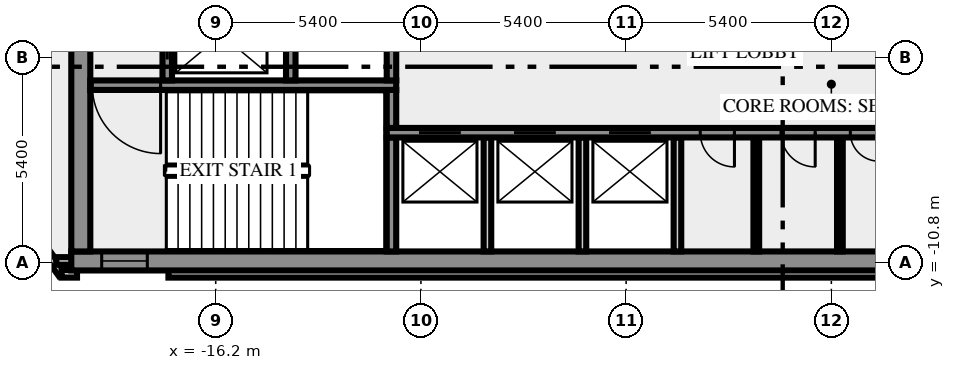
"""IFC4 building model, lengths in metres.
Left out: names, types, materials, properties, quantities, classifications, styles, units other than length and angle.
Written with IfcOpenShell. Run it as: python <this file> out.ifc"""

import sys

from ifc_helpers import new_model, si_unit, direction, frame, frame_2d, origin, place, context, subcontext, project, spatial, rectangle, extrude, element, fill, save


model = new_model("IFC4")
c1 = context("Model", 3, precision=1e-05, world=origin(), true_north=direction((0.0, 1.0)))
c2 = subcontext(c1, "Body", "Model", "MODEL_VIEW")
j1 = project(units=[si_unit("LENGTHUNIT", "METRE"), si_unit("PLANEANGLEUNIT", "RADIAN")], contexts=[c1])
p1 = place(None, origin())
s1 = spatial("IfcSite", under=j1, at=p1, CompositionType="ELEMENT")
p2 = place(p1, origin())
s2 = spatial("IfcBuilding", under=s1, at=p2, CompositionType="ELEMENT")
p3 = place(p2, frame((0.0, 0.0, 89.0)))
s3 = spatial("IfcBuildingStorey", under=s2, at=p3, CompositionType="ELEMENT", Elevation=89.0)
p4 = place(p3, frame((-21.833, -8.909, 0.0), z_axis=(0.0, 0.0, 1.0), x_axis=(0.587766567315, -0.809030569476, 0.0)))
e1 = element("IfcWall", 1, at=p4, inside=s3, PredefinedType="SOLIDWALL", context=c2, shape_type="SweptSolid", body=[
    extrude(rectangle(XDim=2.688, YDim=0.2, at=frame_2d((1.344, 0.0))), origin(), (0.0, 0.0, 1.0), 3.65),
])
p5 = place(p3, frame((-20.256, -11.088, 0.0), z_axis=(0.0, 0.0, 1.0), x_axis=(1.0, 0.0, 0.0)))
e2 = element("IfcWall", 2, at=p5, inside=s3, PredefinedType="SOLIDWALL", context=c2, shape_type="SweptSolid", body=[
    extrude(rectangle(XDim=0.406, YDim=0.2, at=frame_2d((0.203, 0.0))), origin(), (0.0, 0.0, 1.0), 3.65),
])
p6 = place(p3, frame((-17.444, -11.088, 0.0), z_axis=(0.0, 0.0, 1.0), x_axis=(1.0, 0.0, 0.0)))
e3 = element("IfcWall", 3, at=p6, inside=s3, PredefinedType="SOLIDWALL", context=c2, shape_type="SweptSolid", body=[
    extrude(rectangle(XDim=34.888, YDim=0.2, at=frame_2d((17.444, 0.0))), origin(), (0.0, 0.0, 1.0), 3.65),
])
p7 = place(p3, frame((-19.98, -10.75, 0.0), z_axis=(0.0, 0.0, 1.0), x_axis=(-1.0, 0.0, 0.0)))
e4 = element("IfcWall", 4, at=p7, inside=s3, PredefinedType="SOLIDWALL", context=c2, shape_type="SweptSolid", body=[
    extrude(rectangle(XDim=0.417, YDim=0.2, at=frame_2d((0.208, 0.0))), origin(), (0.0, 0.0, 1.0), 3.65),
])
p8 = place(p3, frame((-20.0, -10.75, 0.0), z_axis=(0.0, 0.0, 1.0), x_axis=(1.0, 0.0, 0.0)))
e5 = element("IfcWall", 5, at=p8, inside=s3, PredefinedType="SHEAR", context=c2, shape_type="SweptSolid", body=[
    extrude(rectangle(XDim=40.0, YDim=0.5, at=frame_2d((20.0, 0.0))), origin(), (0.0, 0.0, 1.0), 3.65),
])
p9 = place(p8, frame((0.8, 0.0, 1.0)))
e6 = element("IfcOpeningElement", 6, at=p9, cuts=e5, PredefinedType="OPENING", context=c2, shape_type="SweptSolid", body=[
    extrude(rectangle(XDim=1.2, YDim=1.2, at=frame_2d((0.6, 0.6))), frame((0.0, 0.26, 0.0), z_axis=(0.0, -1.0, 0.0), x_axis=(1.0, 0.0, 0.0)), (0.0, 0.0, 1.0), 0.52),
])
p10 = place(p8, frame((38.0, 0.0, 1.0)))
e7 = element("IfcOpeningElement", 7, at=p10, cuts=e5, PredefinedType="OPENING", context=c2, shape_type="SweptSolid", body=[
    extrude(rectangle(XDim=1.2, YDim=1.2, at=frame_2d((0.6, 0.6))), frame((0.0, 0.26, 0.0), z_axis=(0.0, -1.0, 0.0), x_axis=(1.0, 0.0, 0.0)), (0.0, 0.0, 1.0), 0.52),
])
p11 = place(p3, frame((-19.75, -10.5, 0.0), z_axis=(0.0, 0.0, 1.0), x_axis=(0.0, 1.0, 0.0)))
e8 = element("IfcWall", 8, at=p11, inside=s3, PredefinedType="SHEAR", context=c2, shape_type="SweptSolid", body=[
    extrude(rectangle(XDim=8.8, YDim=0.5, at=frame_2d((4.4, 0.0))), origin(), (0.0, 0.0, 1.0), 3.65),
])
p12 = place(p3, frame((-11.575, -10.5, 0.0), z_axis=(0.0, 0.0, 1.0), x_axis=(0.0, 1.0, 0.0)))
e9 = element("IfcWall", 9, at=p12, inside=s3, PredefinedType="SHEAR", context=c2, shape_type="SweptSolid", body=[
    extrude(rectangle(XDim=3.0, YDim=0.25, at=frame_2d((1.5, 0.0))), origin(), (0.0, 0.0, 1.0), 3.65),
])
for number, where, z_axis, x_axis in (
    (10, (-9.05, -10.5, 0.0), (0.0, 0.0, 1.0), (0.0, 1.0, 0.0)),
    (11, (-6.55, -10.5, 0.0), (0.0, 0.0, 1.0), (0.0, 1.0, 0.0)),
    (12, (-4.05, -10.5, 0.0), (0.0, 0.0, 1.0), (0.0, 1.0, 0.0)),
):
    element("IfcWall", number, at=place(p3, frame(where, z_axis=z_axis, x_axis=x_axis)), inside=s3, PredefinedType="SOLIDWALL", context=c2, shape_type="SweptSolid", body=[
        extrude(rectangle(XDim=3.0, YDim=0.2, at=frame_2d((1.5, 0.0))), origin(), (0.0, 0.0, 1.0), 3.65),
    ])
for number, where, z_axis, x_axis in (
    (13, (-1.975, -10.5, 0.0), (0.0, 0.0, 1.0), (0.0, 1.0, 0.0)),
    (14, (0.225, -10.5, 0.0), (0.0, 0.0, 1.0), (0.0, 1.0, 0.0)),
):
    element("IfcWall", number, at=place(p3, frame(where, z_axis=z_axis, x_axis=x_axis)), inside=s3, PredefinedType="PARTITIONING", context=c2, shape_type="SweptSolid", body=[
        extrude(rectangle(XDim=3.0, YDim=0.15, at=frame_2d((1.5, 0.0))), origin(), (0.0, 0.0, 1.0), 3.65),
    ])
p13 = place(p3, frame((11.7, -7.375, 0.0), z_axis=(0.0, 0.0, 1.0), x_axis=(-1.0, 0.0, 0.0)))
e15 = element("IfcWall", 15, at=p13, inside=s3, PredefinedType="SHEAR", context=c2, shape_type="SweptSolid", body=[
    extrude(rectangle(XDim=23.4, YDim=0.25, at=frame_2d((11.7, 0.0))), origin(), (0.0, 0.0, 1.0), 3.65),
])
p14 = place(p13, frame((21.45, 0.0, 0.0)))
e16 = element("IfcOpeningElement", 16, at=p14, cuts=e15, PredefinedType="OPENING", context=c2, shape_type="SweptSolid", body=[
    extrude(rectangle(XDim=1.1, YDim=2.1, at=frame_2d((0.55, 1.05))), frame((0.0, 0.135, 0.0), z_axis=(0.0, -1.0, 0.0), x_axis=(1.0, 0.0, 0.0)), (0.0, 0.0, 1.0), 0.27),
])
p15 = place(p13, frame((18.95, 0.0, 0.0)))
e17 = element("IfcOpeningElement", 17, at=p15, cuts=e15, PredefinedType="OPENING", context=c2, shape_type="SweptSolid", body=[
    extrude(rectangle(XDim=1.1, YDim=2.1, at=frame_2d((0.55, 1.05))), frame((0.0, 0.135, 0.0), z_axis=(0.0, -1.0, 0.0), x_axis=(1.0, 0.0, 0.0)), (0.0, 0.0, 1.0), 0.27),
])
p16 = place(p13, frame((16.45, 0.0, 0.0)))
e18 = element("IfcOpeningElement", 18, at=p16, cuts=e15, PredefinedType="OPENING", context=c2, shape_type="SweptSolid", body=[
    extrude(rectangle(XDim=1.1, YDim=2.1, at=frame_2d((0.55, 1.05))), frame((0.0, 0.135, 0.0), z_axis=(0.0, -1.0, 0.0), x_axis=(1.0, 0.0, 0.0)), (0.0, 0.0, 1.0), 0.27),
])
p17 = place(p13, frame((14.25, 0.0, 0.0)))
e19 = element("IfcOpeningElement", 19, at=p17, cuts=e15, PredefinedType="OPENING", context=c2, shape_type="SweptSolid", body=[
    extrude(rectangle(XDim=0.9, YDim=2.1, at=frame_2d((0.45, 1.05))), frame((0.0, 0.135, 0.0), z_axis=(0.0, -1.0, 0.0), x_axis=(1.0, 0.0, 0.0)), (0.0, 0.0, 1.0), 0.27),
])
p18 = place(p13, frame((12.125, 0.0, 0.0)))
e20 = element("IfcOpeningElement", 20, at=p18, cuts=e15, PredefinedType="OPENING", context=c2, shape_type="SweptSolid", body=[
    extrude(rectangle(XDim=0.9, YDim=2.1, at=frame_2d((0.45, 1.05))), frame((0.0, 0.135, 0.0), z_axis=(0.0, -1.0, 0.0), x_axis=(1.0, 0.0, 0.0)), (0.0, 0.0, 1.0), 0.27),
])
p19 = place(p13, frame((10.45, 0.0, 0.0)))
e21 = element("IfcOpeningElement", 21, at=p19, cuts=e15, PredefinedType="OPENING", context=c2, shape_type="SweptSolid", body=[
    extrude(rectangle(XDim=0.75, YDim=2.1, at=frame_2d((0.375, 1.05))), frame((0.0, 0.135, 0.0), z_axis=(0.0, -1.0, 0.0), x_axis=(1.0, 0.0, 0.0)), (0.0, 0.0, 1.0), 0.27),
])
p20 = place(p3, frame((-11.575, -7.25, 0.0), z_axis=(0.0, 0.0, 1.0), x_axis=(0.0, 1.0, 0.0)))
e22 = element("IfcWall", 22, at=p20, inside=s3, PredefinedType="SHEAR", context=c2, shape_type="SweptSolid", body=[
    extrude(rectangle(XDim=1.0, YDim=0.25, at=frame_2d((0.5, 0.0))), origin(), (0.0, 0.0, 1.0), 3.65),
])
p21 = place(p3, frame((-11.45, -6.125, 0.0), z_axis=(0.0, 0.0, 1.0), x_axis=(-1.0, 0.0, 0.0)))
e23 = element("IfcWall", 23, at=p21, inside=s3, PredefinedType="SHEAR", context=c2, shape_type="SweptSolid", body=[
    extrude(rectangle(XDim=8.05, YDim=0.25, at=frame_2d((4.025, 0.0))), origin(), (0.0, 0.0, 1.0), 3.65),
])
p22 = place(p21, frame((6.2, 0.0, 0.0)))
e24 = element("IfcOpeningElement", 24, at=p22, cuts=e23, PredefinedType="OPENING", context=c2, shape_type="SweptSolid", body=[
    extrude(rectangle(XDim=1.8, YDim=2.1, at=frame_2d((0.9, 1.05))), frame((0.0, 0.135, 0.0), z_axis=(0.0, -1.0, 0.0), x_axis=(1.0, 0.0, 0.0)), (0.0, 0.0, 1.0), 0.27),
])
p23 = place(p3, frame((-17.475, -6.0, 0.0), z_axis=(0.0, 0.0, 1.0), x_axis=(0.0, 1.0, 0.0)))
e25 = element("IfcWall", 25, at=p23, inside=s3, PredefinedType="SHEAR", context=c2, shape_type="SweptSolid", body=[
    extrude(rectangle(XDim=4.3, YDim=0.25, at=frame_2d((2.15, 0.0))), origin(), (0.0, 0.0, 1.0), 3.65),
])
p24 = place(p23, frame((0.55, 0.0, 0.0)))
e26 = element("IfcOpeningElement", 26, at=p24, cuts=e25, PredefinedType="OPENING", context=c2, shape_type="SweptSolid", body=[
    extrude(rectangle(XDim=1.3, YDim=2.1, at=frame_2d((0.65, 1.05))), frame((0.0, 0.135, 0.0), z_axis=(0.0, -1.0, 0.0), x_axis=(1.0, 0.0, 0.0)), (0.0, 0.0, 1.0), 0.27),
])
for number, where, z_axis, x_axis in (
    (27, (-14.225, -6.0, 0.0), (0.0, 0.0, 1.0), (0.0, 1.0, 0.0)),
    (28, (-11.575, -6.0, 0.0), (0.0, 0.0, 1.0), (0.0, 1.0, 0.0)),
):
    element("IfcWall", number, at=place(p3, frame(where, z_axis=z_axis, x_axis=x_axis)), inside=s3, PredefinedType="SHEAR", context=c2, shape_type="SweptSolid", body=[
        extrude(rectangle(XDim=1.75, YDim=0.25, at=frame_2d((0.875, 0.0))), origin(), (0.0, 0.0, 1.0), 3.65),
    ])
p25 = place(p9, origin())
e29 = element("IfcWindow", 29, at=p25, inside=s3, PartitioningType="SINGLE_PANEL", PredefinedType="WINDOW", context=c2, shape_type="SweptSolid", body=[
    extrude(rectangle(XDim=1.2, YDim=1.2, at=frame_2d((0.6, 0.6))), frame((0.0, 0.03, 0.0), z_axis=(0.0, -1.0, 0.0), x_axis=(1.0, 0.0, 0.0)), (0.0, 0.0, 1.0), 0.06),
])
fill(e6, e29)
p26 = place(p14, origin())
e30 = element("IfcDoor", 30, at=p26, inside=s3, OperationType="DOUBLE_DOOR_SLIDING", PredefinedType="DOOR", context=c2, shape_type="SweptSolid", body=[
    extrude(rectangle(XDim=1.1, YDim=2.1, at=frame_2d((0.55, 1.05))), frame((0.0, 0.025, 0.0), z_axis=(0.0, -1.0, 0.0), x_axis=(1.0, 0.0, 0.0)), (0.0, 0.0, 1.0), 0.05),
])
fill(e16, e30)
p27 = place(p15, origin())
e31 = element("IfcDoor", 31, at=p27, inside=s3, OperationType="DOUBLE_DOOR_SLIDING", PredefinedType="DOOR", context=c2, shape_type="SweptSolid", body=[
    extrude(rectangle(XDim=1.1, YDim=2.1, at=frame_2d((0.55, 1.05))), frame((0.0, 0.025, 0.0), z_axis=(0.0, -1.0, 0.0), x_axis=(1.0, 0.0, 0.0)), (0.0, 0.0, 1.0), 0.05),
])
fill(e17, e31)
p28 = place(p16, origin())
e32 = element("IfcDoor", 32, at=p28, inside=s3, OperationType="DOUBLE_DOOR_SLIDING", PredefinedType="DOOR", context=c2, shape_type="SweptSolid", body=[
    extrude(rectangle(XDim=1.1, YDim=2.1, at=frame_2d((0.55, 1.05))), frame((0.0, 0.025, 0.0), z_axis=(0.0, -1.0, 0.0), x_axis=(1.0, 0.0, 0.0)), (0.0, 0.0, 1.0), 0.05),
])
fill(e18, e32)
p29 = place(p17, origin())
e33 = element("IfcDoor", 33, at=p29, inside=s3, OperationType="SINGLE_SWING_RIGHT", PredefinedType="DOOR", context=c2, shape_type="SweptSolid", body=[
    extrude(rectangle(XDim=0.9, YDim=2.1, at=frame_2d((0.45, 1.05))), frame((0.0, 0.025, 0.0), z_axis=(0.0, -1.0, 0.0), x_axis=(1.0, 0.0, 0.0)), (0.0, 0.0, 1.0), 0.05),
])
fill(e19, e33)
p30 = place(p18, origin())
e34 = element("IfcDoor", 34, at=p30, inside=s3, OperationType="SINGLE_SWING_RIGHT", PredefinedType="DOOR", context=c2, shape_type="SweptSolid", body=[
    extrude(rectangle(XDim=0.9, YDim=2.1, at=frame_2d((0.45, 1.05))), frame((0.0, 0.025, 0.0), z_axis=(0.0, -1.0, 0.0), x_axis=(1.0, 0.0, 0.0)), (0.0, 0.0, 1.0), 0.05),
])
fill(e20, e34)
p31 = place(p19, origin())
e35 = element("IfcDoor", 35, at=p31, inside=s3, OperationType="SINGLE_SWING_LEFT", PredefinedType="DOOR", context=c2, shape_type="SweptSolid", body=[
    extrude(rectangle(XDim=0.75, YDim=2.1, at=frame_2d((0.375, 1.05))), frame((0.0, 0.025, 0.0), z_axis=(0.0, -1.0, 0.0), x_axis=(1.0, 0.0, 0.0)), (0.0, 0.0, 1.0), 0.05),
])
fill(e21, e35)
p32 = place(p22, origin())
e36 = element("IfcDoor", 36, at=p32, inside=s3, OperationType="DOUBLE_DOOR_SINGLE_SWING", PredefinedType="DOOR", context=c2, shape_type="SweptSolid", body=[
    extrude(rectangle(XDim=1.8, YDim=2.1, at=frame_2d((0.9, 1.05))), frame((0.0, 0.025, 0.0), z_axis=(0.0, -1.0, 0.0), x_axis=(1.0, 0.0, 0.0)), (0.0, 0.0, 1.0), 0.05),
])
fill(e24, e36)
p33 = place(p24, origin())
e37 = element("IfcDoor", 37, at=p33, inside=s3, OperationType="DOUBLE_DOOR_SLIDING", PredefinedType="DOOR", context=c2, shape_type="SweptSolid", body=[
    extrude(rectangle(XDim=1.3, YDim=2.1, at=frame_2d((0.65, 1.05))), frame((0.0, 0.025, 0.0), z_axis=(0.0, -1.0, 0.0), x_axis=(1.0, 0.0, 0.0)), (0.0, 0.0, 1.0), 0.05),
])
fill(e26, e37)
save(model, sys.argv[1])
